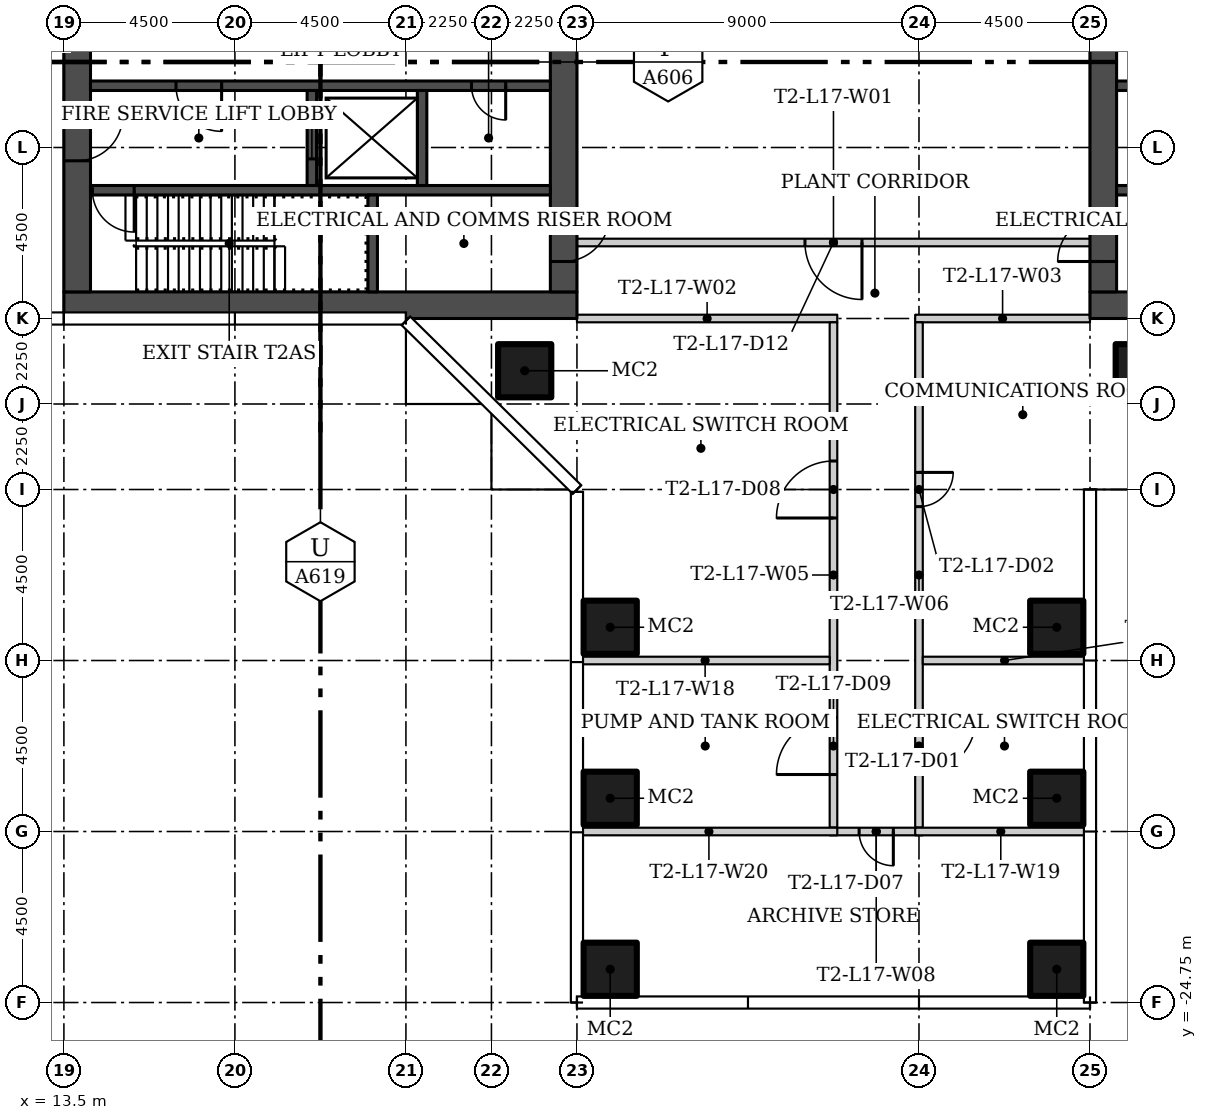
"""IFC4 building model, lengths in metres.
Left out: names, types, materials, properties, quantities, classifications, styles, units other than length and angle.
Written with IfcOpenShell. Run it as: python <this file> out.ifc"""

import sys

from ifc_helpers import new_model, si_unit, direction, frame, frame_2d, origin, origin_2d, place, context, subcontext, project, spatial, rectangle, hollow_rectangle, extrude, element, fill, save


model = new_model("IFC4")
c1 = context("Model", 3, precision=1e-05, world=origin(), true_north=direction((0.0, 1.0)))
c2 = subcontext(c1, "Body", "Model", "MODEL_VIEW")
j1 = project(units=[si_unit("LENGTHUNIT", "METRE"), si_unit("PLANEANGLEUNIT", "RADIAN")], contexts=[c1])
p1 = place(None, origin())
s1 = spatial("IfcSite", under=j1, at=p1, CompositionType="ELEMENT")
p2 = place(p1, origin())
s2 = spatial("IfcBuilding", under=s1, at=p2, CompositionType="ELEMENT")
p3 = place(p2, frame((0.0, 0.0, 77.1)))
s3 = spatial("IfcBuildingStorey", under=s2, at=p3, CompositionType="ELEMENT", Elevation=77.1)
for number, where in (
    (1, (25.625, -8.125, 0.0)),
    (2, (41.875, -8.125, 0.0)),
    (3, (39.625, -14.875, 0.0)),
    (4, (39.625, -19.375, 0.0)),
    (5, (39.625, -23.875, 0.0)),
    (6, (27.875, -14.875, 0.0)),
    (7, (27.875, -19.375, 0.0)),
    (8, (27.875, -23.875, 0.0)),
):
    element("IfcColumn", number, at=place(p3, frame(where)), inside=s3, PredefinedType="COLUMN", context=c2, shape_type="SweptSolid", body=[
        extrude(hollow_rectangle(XDim=1.4, YDim=1.4, WallThickness=0.05, at=origin_2d()), origin(), (0.0, 0.0, 1.0), 4.45),
    ])
p4 = place(p3, frame((40.5, -4.75, 0.0), z_axis=(0.0, 0.0, 1.0), x_axis=(-1.0, 0.0, 0.0)))
e9 = element("IfcWall", 9, at=p4, inside=s3, PredefinedType="PARTITIONING", context=c2, shape_type="SweptSolid", body=[
    extrude(rectangle(XDim=13.5, YDim=0.2, at=frame_2d((6.75, 0.0))), origin(), (0.0, 0.0, 1.0), 4.45),
])
p5 = place(p4, frame((6.0, 0.0, 0.0)))
e10 = element("IfcOpeningElement", 10, at=p5, cuts=e9, PredefinedType="OPENING", context=c2, shape_type="SweptSolid", body=[
    extrude(rectangle(XDim=1.5, YDim=2.4, at=frame_2d((0.75, 1.2))), frame((0.0, 0.11, 0.0), z_axis=(0.0, -1.0, 0.0), x_axis=(1.0, 0.0, 0.0)), (0.0, 0.0, 1.0), 0.22),
])
p6 = place(p3, frame((33.85, -6.75, 0.0), z_axis=(0.0, 0.0, 1.0), x_axis=(-1.0, 0.0, 0.0)))
e11 = element("IfcWall", 11, at=p6, inside=s3, PredefinedType="PARTITIONING", context=c2, shape_type="SweptSolid", body=[
    extrude(rectangle(XDim=6.85, YDim=0.2, at=frame_2d((3.425, 0.0))), origin(), (0.0, 0.0, 1.0), 4.45),
])
p7 = place(p3, frame((40.5, -6.75, 0.0), z_axis=(0.0, 0.0, 1.0), x_axis=(-1.0, 0.0, 0.0)))
e12 = element("IfcWall", 12, at=p7, inside=s3, PredefinedType="PARTITIONING", context=c2, shape_type="SweptSolid", body=[
    extrude(rectangle(XDim=4.6, YDim=0.2, at=frame_2d((2.3, 0.0))), origin(), (0.0, 0.0, 1.0), 4.45),
])
p8 = place(p3, frame((33.75, -20.15, 0.0), z_axis=(0.0, 0.0, 1.0), x_axis=(0.0, 1.0, 0.0)))
e13 = element("IfcWall", 13, at=p8, inside=s3, PredefinedType="PARTITIONING", context=c2, shape_type="SweptSolid", body=[
    extrude(rectangle(XDim=13.3, YDim=0.2, at=frame_2d((6.65, 0.0))), origin(), (0.0, 0.0, 1.0), 4.45),
])
p9 = place(p8, frame((8.15, 0.0, 0.0)))
e14 = element("IfcOpeningElement", 14, at=p9, cuts=e13, PredefinedType="OPENING", context=c2, shape_type="SweptSolid", body=[
    extrude(rectangle(XDim=1.5, YDim=2.4, at=frame_2d((0.75, 1.2))), frame((0.0, 0.11, 0.0), z_axis=(0.0, -1.0, 0.0), x_axis=(1.0, 0.0, 0.0)), (0.0, 0.0, 1.0), 0.22),
])
p10 = place(p8, frame((1.4, 0.0, 0.0)))
e15 = element("IfcOpeningElement", 15, at=p10, cuts=e13, PredefinedType="OPENING", context=c2, shape_type="SweptSolid", body=[
    extrude(rectangle(XDim=1.5, YDim=2.4, at=frame_2d((0.75, 1.2))), frame((0.0, 0.11, 0.0), z_axis=(0.0, -1.0, 0.0), x_axis=(1.0, 0.0, 0.0)), (0.0, 0.0, 1.0), 0.22),
])
p11 = place(p3, frame((36.0, -6.85, 0.0), z_axis=(0.0, 0.0, 1.0), x_axis=(0.0, -1.0, 0.0)))
e16 = element("IfcWall", 16, at=p11, inside=s3, PredefinedType="PARTITIONING", context=c2, shape_type="SweptSolid", body=[
    extrude(rectangle(XDim=13.3, YDim=0.2, at=frame_2d((6.65, 0.0))), origin(), (0.0, 0.0, 1.0), 4.45),
])
p12 = place(p11, frame((10.4, 0.0, 0.0)))
e17 = element("IfcOpeningElement", 17, at=p12, cuts=e16, PredefinedType="OPENING", context=c2, shape_type="SweptSolid", body=[
    extrude(rectangle(XDim=1.5, YDim=2.4, at=frame_2d((0.75, 1.2))), frame((0.0, 0.11, 0.0), z_axis=(0.0, -1.0, 0.0), x_axis=(1.0, 0.0, 0.0)), (0.0, 0.0, 1.0), 0.22),
])
p13 = place(p11, frame((3.95, 0.0, 0.0)))
e18 = element("IfcOpeningElement", 18, at=p13, cuts=e16, PredefinedType="OPENING", context=c2, shape_type="SweptSolid", body=[
    extrude(rectangle(XDim=0.9, YDim=2.1, at=frame_2d((0.45, 1.05))), frame((0.0, 0.11, 0.0), z_axis=(0.0, -1.0, 0.0), x_axis=(1.0, 0.0, 0.0)), (0.0, 0.0, 1.0), 0.22),
])
p14 = place(p3, frame((36.1, -20.25, 0.0), z_axis=(0.0, 0.0, 1.0), x_axis=(-1.0, 0.0, 0.0)))
e19 = element("IfcWall", 19, at=p14, inside=s3, PredefinedType="PARTITIONING", context=c2, shape_type="SweptSolid", body=[
    extrude(rectangle(XDim=2.45, YDim=0.2, at=frame_2d((1.225, 0.0))), origin(), (0.0, 0.0, 1.0), 4.45),
])
p15 = place(p14, frame((0.775, 0.0, 0.0)))
e20 = element("IfcOpeningElement", 20, at=p15, cuts=e19, PredefinedType="OPENING", context=c2, shape_type="SweptSolid", body=[
    extrude(rectangle(XDim=0.9, YDim=2.1, at=frame_2d((0.45, 1.05))), frame((0.0, 0.11, 0.0), z_axis=(0.0, -1.0, 0.0), x_axis=(1.0, 0.0, 0.0)), (0.0, 0.0, 1.0), 0.22),
])
p16 = place(p3, frame((36.1, -15.75, 0.0)))
e21 = element("IfcWall", 21, at=p16, inside=s3, PredefinedType="PARTITIONING", context=c2, shape_type="SweptSolid", body=[
    extrude(rectangle(XDim=4.305, YDim=0.2, at=frame_2d((2.152, 0.0))), origin(), (0.0, 0.0, 1.0), 4.45),
])
p17 = place(p3, frame((27.095, -15.75, 0.0)))
e22 = element("IfcWall", 22, at=p17, inside=s3, PredefinedType="PARTITIONING", context=c2, shape_type="SweptSolid", body=[
    extrude(rectangle(XDim=6.555, YDim=0.2, at=frame_2d((3.277, 0.0))), origin(), (0.0, 0.0, 1.0), 4.45),
])
p18 = place(p3, frame((35.9, -20.25, 0.0)))
e23 = element("IfcWall", 23, at=p18, inside=s3, PredefinedType="PARTITIONING", context=c2, shape_type="SweptSolid", body=[
    extrude(rectangle(XDim=4.505, YDim=0.2, at=frame_2d((2.252, 0.0))), origin(), (0.0, 0.0, 1.0), 4.45),
])
p19 = place(p3, frame((27.095, -20.25, 0.0)))
e24 = element("IfcWall", 24, at=p19, inside=s3, PredefinedType="PARTITIONING", context=c2, shape_type="SweptSolid", body=[
    extrude(rectangle(XDim=6.755, YDim=0.2, at=frame_2d((3.377, 0.0))), origin(), (0.0, 0.0, 1.0), 4.45),
])
p20 = place(p3, frame((13.5, -6.4, 0.0)))
e25 = element("IfcWall", 25, at=p20, inside=s3, PredefinedType="SHEAR", context=c2, shape_type="SweptSolid", body=[
    extrude(rectangle(XDim=13.5, YDim=0.7, at=frame_2d((6.75, 0.0))), origin(), (0.0, 0.0, 1.0), 4.45),
])
p21 = place(p3, frame((13.85, 6.05, 0.0), z_axis=(0.0, 0.0, 1.0), x_axis=(0.0, -1.0, 0.0)))
e26 = element("IfcWall", 26, at=p21, inside=s3, PredefinedType="SHEAR", context=c2, shape_type="SweptSolid", body=[
    extrude(rectangle(XDim=12.1, YDim=0.7, at=frame_2d((6.05, 0.0))), origin(), (0.0, 0.0, 1.0), 4.45),
])
p22 = place(p21, frame((7.45, 0.0, 0.0)))
e27 = element("IfcOpeningElement", 27, at=p22, cuts=e26, PredefinedType="OPENING", context=c2, shape_type="SweptSolid", body=[
    extrude(rectangle(XDim=1.2, YDim=2.1, at=frame_2d((0.6, 1.05))), frame((0.0, 0.36, 0.0), z_axis=(0.0, -1.0, 0.0), x_axis=(1.0, 0.0, 0.0)), (0.0, 0.0, 1.0), 0.72),
])
p23 = place(p21, frame((3.9, 0.0, 0.0)))
e28 = element("IfcOpeningElement", 28, at=p23, cuts=e26, PredefinedType="OPENING", context=c2, shape_type="SweptSolid", body=[
    extrude(rectangle(XDim=1.8, YDim=2.4, at=frame_2d((0.9, 1.2))), frame((0.0, 0.36, 0.0), z_axis=(0.0, -1.0, 0.0), x_axis=(1.0, 0.0, 0.0)), (0.0, 0.0, 1.0), 0.72),
])
p24 = place(p3, frame((26.65, 6.05, 0.0), z_axis=(0.0, 0.0, 1.0), x_axis=(0.0, -1.0, 0.0)))
e29 = element("IfcWall", 29, at=p24, inside=s3, PredefinedType="SHEAR", context=c2, shape_type="SweptSolid", body=[
    extrude(rectangle(XDim=12.1, YDim=0.7, at=frame_2d((6.05, 0.0))), origin(), (0.0, 0.0, 1.0), 4.45),
])
p25 = place(p24, frame((10.1, 0.0, 0.0)))
e30 = element("IfcOpeningElement", 30, at=p25, cuts=e29, PredefinedType="OPENING", context=c2, shape_type="SweptSolid", body=[
    extrude(rectangle(XDim=1.2, YDim=2.1, at=frame_2d((0.6, 1.05))), frame((0.0, 0.36, 0.0), z_axis=(0.0, -1.0, 0.0), x_axis=(1.0, 0.0, 0.0)), (0.0, 0.0, 1.0), 0.72),
])
p26 = place(p24, frame((3.9, 0.0, 0.0)))
e31 = element("IfcOpeningElement", 31, at=p26, cuts=e29, PredefinedType="OPENING", context=c2, shape_type="SweptSolid", body=[
    extrude(rectangle(XDim=1.8, YDim=2.4, at=frame_2d((0.9, 1.2))), frame((0.0, 0.36, 0.0), z_axis=(0.0, -1.0, 0.0), x_axis=(1.0, 0.0, 0.0)), (0.0, 0.0, 1.0), 0.72),
])
p27 = place(p3, frame((26.3, -3.375, 0.0), z_axis=(0.0, 0.0, 1.0), x_axis=(-1.0, 0.0, 0.0)))
e32 = element("IfcWall", 32, at=p27, inside=s3, PredefinedType="SHEAR", context=c2, shape_type="SweptSolid", body=[
    extrude(rectangle(XDim=12.1, YDim=0.25, at=frame_2d((6.05, 0.0))), origin(), (0.0, 0.0, 1.0), 4.45),
])
p28 = place(p27, frame((10.95, 0.0, 0.0)))
e33 = element("IfcOpeningElement", 33, at=p28, cuts=e32, PredefinedType="OPENING", context=c2, shape_type="SweptSolid", body=[
    extrude(rectangle(XDim=1.1, YDim=2.1, at=frame_2d((0.55, 1.05))), frame((0.0, 0.135, 0.0), z_axis=(0.0, -1.0, 0.0), x_axis=(1.0, 0.0, 0.0)), (0.0, 0.0, 1.0), 0.27),
])
p29 = place(p3, frame((21.625, -6.05, 0.0), z_axis=(0.0, 0.0, 1.0), x_axis=(0.0, 1.0, 0.0)))
e34 = element("IfcWall", 34, at=p29, inside=s3, PredefinedType="SHEAR", context=c2, shape_type="SweptSolid", body=[
    extrude(rectangle(XDim=2.55, YDim=0.25, at=frame_2d((1.275, 0.0))), origin(), (0.0, 0.0, 1.0), 4.45),
])
p30 = place(p3, frame((26.3, -0.625, 0.0), z_axis=(0.0, 0.0, 1.0), x_axis=(-1.0, 0.0, 0.0)))
e35 = element("IfcWall", 35, at=p30, inside=s3, PredefinedType="SHEAR", context=c2, shape_type="SweptSolid", body=[
    extrude(rectangle(XDim=12.1, YDim=0.25, at=frame_2d((6.05, 0.0))), origin(), (0.0, 0.0, 1.0), 4.45),
])
p31 = place(p30, frame((8.65, 0.0, 0.0)))
e36 = element("IfcOpeningElement", 36, at=p31, cuts=e35, PredefinedType="OPENING", context=c2, shape_type="SweptSolid", body=[
    extrude(rectangle(XDim=1.2, YDim=2.1, at=frame_2d((0.6, 1.05))), frame((0.0, 0.135, 0.0), z_axis=(0.0, -1.0, 0.0), x_axis=(1.0, 0.0, 0.0)), (0.0, 0.0, 1.0), 0.27),
])
p32 = place(p30, frame((1.175, 0.0, 0.0)))
e37 = element("IfcOpeningElement", 37, at=p32, cuts=e35, PredefinedType="OPENING", context=c2, shape_type="SweptSolid", body=[
    extrude(rectangle(XDim=0.9, YDim=2.1, at=frame_2d((0.45, 1.05))), frame((0.0, 0.135, 0.0), z_axis=(0.0, -1.0, 0.0), x_axis=(1.0, 0.0, 0.0)), (0.0, 0.0, 1.0), 0.27),
])
p33 = place(p3, frame((20.025, -3.25, 0.0), z_axis=(0.0, 0.0, 1.0), x_axis=(0.0, 1.0, 0.0)))
e38 = element("IfcWall", 38, at=p33, inside=s3, PredefinedType="SHEAR", context=c2, shape_type="SweptSolid", body=[
    extrude(rectangle(XDim=2.5, YDim=0.25, at=frame_2d((1.25, 0.0))), origin(), (0.0, 0.0, 1.0), 4.45),
])
p34 = place(p33, frame((0.7, 0.0, 0.0)))
e39 = element("IfcOpeningElement", 39, at=p34, cuts=e38, PredefinedType="OPENING", context=c2, shape_type="SweptSolid", body=[
    extrude(rectangle(XDim=1.1, YDim=2.1, at=frame_2d((0.55, 1.05))), frame((0.0, 0.135, 0.0), z_axis=(0.0, -1.0, 0.0), x_axis=(1.0, 0.0, 0.0)), (0.0, 0.0, 1.0), 0.27),
])
p35 = place(p3, frame((22.925, -3.25, 0.0), z_axis=(0.0, 0.0, 1.0), x_axis=(0.0, 1.0, 0.0)))
e40 = element("IfcWall", 40, at=p35, inside=s3, PredefinedType="SHEAR", context=c2, shape_type="SweptSolid", body=[
    extrude(rectangle(XDim=2.5, YDim=0.25, at=frame_2d((1.25, 0.0))), origin(), (0.0, 0.0, 1.0), 4.45),
])
p36 = place(p3, frame((54.0, -6.4, 0.0), z_axis=(0.0, 0.0, 1.0), x_axis=(-1.0, 0.0, 0.0)))
e41 = element("IfcWall", 41, at=p36, inside=s3, PredefinedType="SHEAR", context=c2, shape_type="SweptSolid", body=[
    extrude(rectangle(XDim=13.5, YDim=0.7, at=frame_2d((6.75, 0.0))), origin(), (0.0, 0.0, 1.0), 4.45),
])
p37 = place(p3, frame((40.85, -6.05, 0.0), z_axis=(0.0, 0.0, 1.0), x_axis=(0.0, 1.0, 0.0)))
e42 = element("IfcWall", 42, at=p37, inside=s3, PredefinedType="SHEAR", context=c2, shape_type="SweptSolid", body=[
    extrude(rectangle(XDim=12.1, YDim=0.7, at=frame_2d((6.05, 0.0))), origin(), (0.0, 0.0, 1.0), 4.45),
])
p38 = place(p37, frame((0.8, 0.0, 0.0)))
e43 = element("IfcOpeningElement", 43, at=p38, cuts=e42, PredefinedType="OPENING", context=c2, shape_type="SweptSolid", body=[
    extrude(rectangle(XDim=1.2, YDim=2.1, at=frame_2d((0.6, 1.05))), frame((0.0, 0.36, 0.0), z_axis=(0.0, -1.0, 0.0), x_axis=(1.0, 0.0, 0.0)), (0.0, 0.0, 1.0), 0.72),
])
p39 = place(p37, frame((6.4, 0.0, 0.0)))
e44 = element("IfcOpeningElement", 44, at=p39, cuts=e42, PredefinedType="OPENING", context=c2, shape_type="SweptSolid", body=[
    extrude(rectangle(XDim=1.8, YDim=2.4, at=frame_2d((0.9, 1.2))), frame((0.0, 0.36, 0.0), z_axis=(0.0, -1.0, 0.0), x_axis=(1.0, 0.0, 0.0)), (0.0, 0.0, 1.0), 0.72),
])
p40 = place(p3, frame((53.3, -3.375, 0.0), z_axis=(0.0, 0.0, 1.0), x_axis=(-1.0, 0.0, 0.0)))
e45 = element("IfcWall", 45, at=p40, inside=s3, PredefinedType="SHEAR", context=c2, shape_type="SweptSolid", body=[
    extrude(rectangle(XDim=12.1, YDim=0.25, at=frame_2d((6.05, 0.0))), origin(), (0.0, 0.0, 1.0), 4.45),
])
p41 = place(p40, frame((0.05, 0.0, 0.0)))
e46 = element("IfcOpeningElement", 46, at=p41, cuts=e45, PredefinedType="OPENING", context=c2, shape_type="SweptSolid", body=[
    extrude(rectangle(XDim=1.1, YDim=2.1, at=frame_2d((0.55, 1.05))), frame((0.0, 0.135, 0.0), z_axis=(0.0, -1.0, 0.0), x_axis=(1.0, 0.0, 0.0)), (0.0, 0.0, 1.0), 0.27),
])
p42 = place(p3, frame((53.3, -0.625, 0.0), z_axis=(0.0, 0.0, 1.0), x_axis=(-1.0, 0.0, 0.0)))
e47 = element("IfcWall", 47, at=p42, inside=s3, PredefinedType="SHEAR", context=c2, shape_type="SweptSolid", body=[
    extrude(rectangle(XDim=12.1, YDim=0.25, at=frame_2d((6.05, 0.0))), origin(), (0.0, 0.0, 1.0), 4.45),
])
p43 = place(p42, frame((2.25, 0.0, 0.0)))
e48 = element("IfcOpeningElement", 48, at=p43, cuts=e47, PredefinedType="OPENING", context=c2, shape_type="SweptSolid", body=[
    extrude(rectangle(XDim=1.2, YDim=2.1, at=frame_2d((0.6, 1.05))), frame((0.0, 0.135, 0.0), z_axis=(0.0, -1.0, 0.0), x_axis=(1.0, 0.0, 0.0)), (0.0, 0.0, 1.0), 0.27),
])
p44 = place(p42, frame((10.025, 0.0, 0.0)))
e49 = element("IfcOpeningElement", 49, at=p44, cuts=e47, PredefinedType="OPENING", context=c2, shape_type="SweptSolid", body=[
    extrude(rectangle(XDim=0.9, YDim=2.1, at=frame_2d((0.45, 1.05))), frame((0.0, 0.135, 0.0), z_axis=(0.0, -1.0, 0.0), x_axis=(1.0, 0.0, 0.0)), (0.0, 0.0, 1.0), 0.27),
])
p45 = place(p12, origin())
e50 = element("IfcDoor", 50, at=p45, inside=s3, OperationType="DOUBLE_DOOR_SINGLE_SWING", PredefinedType="DOOR", context=c2, shape_type="SweptSolid", body=[
    extrude(rectangle(XDim=1.5, YDim=2.4, at=frame_2d((0.75, 1.2))), frame((0.0, 0.025, 0.0), z_axis=(0.0, -1.0, 0.0), x_axis=(1.0, 0.0, 0.0)), (0.0, 0.0, 1.0), 0.05),
])
fill(e17, e50)
p46 = place(p13, origin())
e51 = element("IfcDoor", 51, at=p46, inside=s3, OperationType="SINGLE_SWING_LEFT", PredefinedType="DOOR", context=c2, shape_type="SweptSolid", body=[
    extrude(rectangle(XDim=0.9, YDim=2.1, at=frame_2d((0.45, 1.05))), frame((0.0, 0.025, 0.0), z_axis=(0.0, -1.0, 0.0), x_axis=(1.0, 0.0, 0.0)), (0.0, 0.0, 1.0), 0.05),
])
fill(e18, e51)
p47 = place(p15, origin())
e52 = element("IfcDoor", 52, at=p47, inside=s3, OperationType="SINGLE_SWING_RIGHT", PredefinedType="DOOR", context=c2, shape_type="SweptSolid", body=[
    extrude(rectangle(XDim=0.9, YDim=2.1, at=frame_2d((0.45, 1.05))), frame((0.0, 0.025, 0.0), z_axis=(0.0, -1.0, 0.0), x_axis=(1.0, 0.0, 0.0)), (0.0, 0.0, 1.0), 0.05),
])
fill(e20, e52)
p48 = place(p9, origin())
e53 = element("IfcDoor", 53, at=p48, inside=s3, OperationType="DOUBLE_DOOR_SINGLE_SWING", PredefinedType="DOOR", context=c2, shape_type="SweptSolid", body=[
    extrude(rectangle(XDim=1.5, YDim=2.4, at=frame_2d((0.75, 1.2))), frame((0.0, 0.025, 0.0), z_axis=(0.0, -1.0, 0.0), x_axis=(1.0, 0.0, 0.0)), (0.0, 0.0, 1.0), 0.05),
])
fill(e14, e53)
p49 = place(p10, origin())
e54 = element("IfcDoor", 54, at=p49, inside=s3, OperationType="DOUBLE_DOOR_SINGLE_SWING", PredefinedType="DOOR", context=c2, shape_type="SweptSolid", body=[
    extrude(rectangle(XDim=1.5, YDim=2.4, at=frame_2d((0.75, 1.2))), frame((0.0, 0.025, 0.0), z_axis=(0.0, -1.0, 0.0), x_axis=(1.0, 0.0, 0.0)), (0.0, 0.0, 1.0), 0.05),
])
fill(e15, e54)
p50 = place(p5, origin())
e55 = element("IfcDoor", 55, at=p50, inside=s3, OperationType="DOUBLE_DOOR_SINGLE_SWING", PredefinedType="DOOR", context=c2, shape_type="SweptSolid", body=[
    extrude(rectangle(XDim=1.5, YDim=2.4, at=frame_2d((0.75, 1.2))), frame((0.0, 0.025, 0.0), z_axis=(0.0, -1.0, 0.0), x_axis=(1.0, 0.0, 0.0)), (0.0, 0.0, 1.0), 0.05),
])
fill(e10, e55)
p51 = place(p22, origin())
e56 = element("IfcDoor", 56, at=p51, inside=s3, OperationType="SINGLE_SWING_RIGHT", PredefinedType="DOOR", context=c2, shape_type="SweptSolid", body=[
    extrude(rectangle(XDim=1.2, YDim=2.1, at=frame_2d((0.6, 1.05))), frame((0.0, 0.025, 0.0), z_axis=(0.0, -1.0, 0.0), x_axis=(1.0, 0.0, 0.0)), (0.0, 0.0, 1.0), 0.05),
])
fill(e27, e56)
p52 = place(p25, origin())
e57 = element("IfcDoor", 57, at=p52, inside=s3, OperationType="SINGLE_SWING_RIGHT", PredefinedType="DOOR", context=c2, shape_type="SweptSolid", body=[
    extrude(rectangle(XDim=1.2, YDim=2.1, at=frame_2d((0.6, 1.05))), frame((0.0, 0.025, 0.0), z_axis=(0.0, -1.0, 0.0), x_axis=(1.0, 0.0, 0.0)), (0.0, 0.0, 1.0), 0.05),
])
fill(e30, e57)
p53 = place(p28, origin())
e58 = element("IfcDoor", 58, at=p53, inside=s3, OperationType="SINGLE_SWING_RIGHT", PredefinedType="DOOR", context=c2, shape_type="SweptSolid", body=[
    extrude(rectangle(XDim=1.1, YDim=2.1, at=frame_2d((0.55, 1.05))), frame((0.0, 0.025, 0.0), z_axis=(0.0, -1.0, 0.0), x_axis=(1.0, 0.0, 0.0)), (0.0, 0.0, 1.0), 0.05),
])
fill(e33, e58)
p54 = place(p31, origin())
e59 = element("IfcDoor", 59, at=p54, inside=s3, OperationType="SINGLE_SWING_RIGHT", PredefinedType="DOOR", context=c2, shape_type="SweptSolid", body=[
    extrude(rectangle(XDim=1.2, YDim=2.1, at=frame_2d((0.6, 1.05))), frame((0.0, 0.025, 0.0), z_axis=(0.0, -1.0, 0.0), x_axis=(1.0, 0.0, 0.0)), (0.0, 0.0, 1.0), 0.05),
])
fill(e36, e59)
p55 = place(p32, origin())
e60 = element("IfcDoor", 60, at=p55, inside=s3, OperationType="SINGLE_SWING_LEFT", PredefinedType="DOOR", context=c2, shape_type="SweptSolid", body=[
    extrude(rectangle(XDim=0.9, YDim=2.1, at=frame_2d((0.45, 1.05))), frame((0.0, 0.025, 0.0), z_axis=(0.0, -1.0, 0.0), x_axis=(1.0, 0.0, 0.0)), (0.0, 0.0, 1.0), 0.05),
])
fill(e37, e60)
p56 = place(p34, origin())
e61 = element("IfcDoor", 61, at=p56, inside=s3, OperationType="SLIDING_TO_LEFT", PredefinedType="DOOR", context=c2, shape_type="SweptSolid", body=[
    extrude(rectangle(XDim=1.1, YDim=2.1, at=frame_2d((0.55, 1.05))), frame((0.0, 0.025, 0.0), z_axis=(0.0, -1.0, 0.0), x_axis=(1.0, 0.0, 0.0)), (0.0, 0.0, 1.0), 0.05),
])
fill(e39, e61)
p57 = place(p38, origin())
e62 = element("IfcDoor", 62, at=p57, inside=s3, OperationType="SINGLE_SWING_LEFT", PredefinedType="DOOR", context=c2, shape_type="SweptSolid", body=[
    extrude(rectangle(XDim=1.2, YDim=2.1, at=frame_2d((0.6, 1.05))), frame((0.0, 0.025, 0.0), z_axis=(0.0, -1.0, 0.0), x_axis=(1.0, 0.0, 0.0)), (0.0, 0.0, 1.0), 0.05),
])
fill(e43, e62)
save(model, sys.argv[1])
